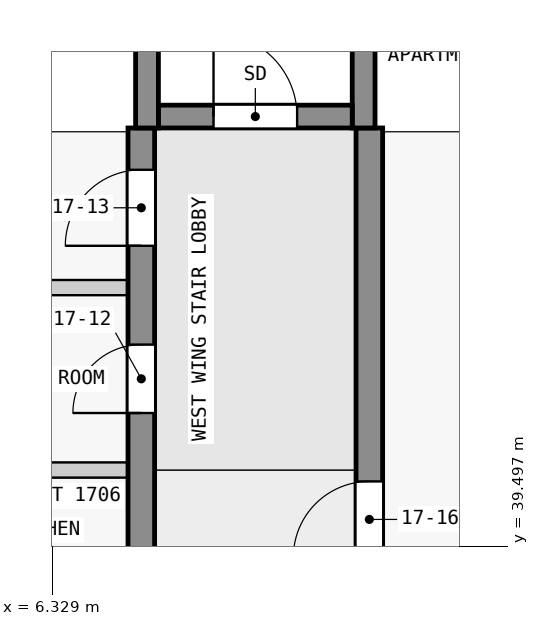
"""IFC4 building model, lengths in metres.
Left out: names, types, materials, properties, quantities, classifications, styles, units other than length and angle.
Written with IfcOpenShell. Run it as: python <this file> out.ifc"""

import sys

from ifc_helpers import new_model, si_unit, direction, frame, frame_2d, origin, place, context, subcontext, project, spatial, rectangle, extrude, element, fill, save


model = new_model("IFC4")
c1 = context("Model", 3, precision=1e-05, world=origin(), true_north=direction((0.0, 1.0)))
c2 = subcontext(c1, "Body", "Model", "MODEL_VIEW")
j1 = project(units=[si_unit("LENGTHUNIT", "METRE"), si_unit("PLANEANGLEUNIT", "RADIAN")], contexts=[c1])
p1 = place(None, origin())
s1 = spatial("IfcSite", under=j1, at=p1, CompositionType="ELEMENT")
p2 = place(p1, origin())
s2 = spatial("IfcBuilding", under=s1, at=p2, CompositionType="ELEMENT")
p3 = place(p2, frame((0.0, 0.0, 68.8)))
s3 = spatial("IfcBuildingStorey", under=s2, at=p3, CompositionType="ELEMENT", Elevation=68.8)
p4 = place(p3, frame((7.725, 45.15, 0.0), z_axis=(0.0, 0.0, 1.0), x_axis=(1.0, 0.0, 0.0)))
e1 = element("IfcWall", 1, at=p4, inside=s3, PredefinedType="SHEAR", context=c2, shape_type="SweptSolid", body=[
    extrude(rectangle(XDim=2.55, YDim=0.3, at=frame_2d((1.275, 0.0))), origin(), (0.0, 0.0, 1.0), 3.5),
])
p5 = place(p4, frame((0.725, 0.0, 0.0)))
e2 = element("IfcOpeningElement", 2, at=p5, cuts=e1, PredefinedType="OPENING", context=c2, shape_type="SweptSolid", body=[
    extrude(rectangle(XDim=1.1, YDim=2.1, at=frame_2d((0.55, 1.05))), frame((0.0, 0.16, 0.0), z_axis=(0.0, -1.0, 0.0), x_axis=(1.0, 0.0, 0.0)), (0.0, 0.0, 1.0), 0.32),
])
for number, where, z_axis, x_axis in (
    (3, (7.575, 45.0, 0.0), (0.0, 0.0, 1.0), (0.0, 1.0, 0.0)),
    (4, (10.425, 45.0, 0.0), (0.0, 0.0, 1.0), (0.0, 1.0, 0.0)),
):
    element("IfcWall", number, at=place(p3, frame(where, z_axis=z_axis, x_axis=x_axis)), inside=s3, PredefinedType="SHEAR", context=c2, shape_type="SweptSolid", body=[
        extrude(rectangle(XDim=7.2, YDim=0.3, at=frame_2d((3.6, 0.0))), origin(), (0.0, 0.0, 1.0), 3.5),
    ])
p6 = place(p3, frame((7.5, 18.0, 0.0), z_axis=(0.0, 0.0, 1.0), x_axis=(0.0, 1.0, 0.0)))
e5 = element("IfcWall", 5, at=p6, inside=s3, PredefinedType="SHEAR", context=c2, shape_type="SweptSolid", body=[
    extrude(rectangle(XDim=27.0, YDim=0.35, at=frame_2d((13.5, 0.0))), origin(), (0.0, 0.0, 1.0), 3.2),
])
p7 = place(p6, frame((1.75, 0.0, 0.0)))
e6 = element("IfcOpeningElement", 6, at=p7, cuts=e5, PredefinedType="OPENING", context=c2, shape_type="SweptSolid", body=[
    extrude(rectangle(XDim=1.0, YDim=2.1, at=frame_2d((0.5, 1.05))), frame((0.0, 0.185, 0.0), z_axis=(0.0, -1.0, 0.0), x_axis=(1.0, 0.0, 0.0)), (0.0, 0.0, 1.0), 0.37),
])
p8 = place(p6, frame((6.25, 0.0, 0.0)))
e7 = element("IfcOpeningElement", 7, at=p8, cuts=e5, PredefinedType="OPENING", context=c2, shape_type="SweptSolid", body=[
    extrude(rectangle(XDim=1.0, YDim=2.1, at=frame_2d((0.5, 1.05))), frame((0.0, 0.185, 0.0), z_axis=(0.0, -1.0, 0.0), x_axis=(1.0, 0.0, 0.0)), (0.0, 0.0, 1.0), 0.37),
])
p9 = place(p6, frame((10.75, 0.0, 0.0)))
e8 = element("IfcOpeningElement", 8, at=p9, cuts=e5, PredefinedType="OPENING", context=c2, shape_type="SweptSolid", body=[
    extrude(rectangle(XDim=1.0, YDim=2.1, at=frame_2d((0.5, 1.05))), frame((0.0, 0.185, 0.0), z_axis=(0.0, -1.0, 0.0), x_axis=(1.0, 0.0, 0.0)), (0.0, 0.0, 1.0), 0.37),
])
p10 = place(p6, frame((17.55, 0.0, 0.0)))
e9 = element("IfcOpeningElement", 9, at=p10, cuts=e5, PredefinedType="OPENING", context=c2, shape_type="SweptSolid", body=[
    extrude(rectangle(XDim=1.0, YDim=2.1, at=frame_2d((0.5, 1.05))), frame((0.0, 0.185, 0.0), z_axis=(0.0, -1.0, 0.0), x_axis=(1.0, 0.0, 0.0)), (0.0, 0.0, 1.0), 0.37),
])
p11 = place(p6, frame((23.25, 0.0, 0.0)))
e10 = element("IfcOpeningElement", 10, at=p11, cuts=e5, PredefinedType="OPENING", context=c2, shape_type="SweptSolid", body=[
    extrude(rectangle(XDim=0.9, YDim=2.1, at=frame_2d((0.45, 1.05))), frame((0.0, 0.185, 0.0), z_axis=(0.0, -1.0, 0.0), x_axis=(1.0, 0.0, 0.0)), (0.0, 0.0, 1.0), 0.37),
])
p12 = place(p6, frame((25.45, 0.0, 0.0)))
e11 = element("IfcOpeningElement", 11, at=p12, cuts=e5, PredefinedType="OPENING", context=c2, shape_type="SweptSolid", body=[
    extrude(rectangle(XDim=1.0, YDim=2.1, at=frame_2d((0.5, 1.05))), frame((0.0, 0.185, 0.0), z_axis=(0.0, -1.0, 0.0), x_axis=(1.0, 0.0, 0.0)), (0.0, 0.0, 1.0), 0.37),
])
p13 = place(p3, frame((10.5, 18.0, 0.0), z_axis=(0.0, 0.0, 1.0), x_axis=(0.0, 1.0, 0.0)))
e12 = element("IfcWall", 12, at=p13, inside=s3, PredefinedType="SHEAR", context=c2, shape_type="SweptSolid", body=[
    extrude(rectangle(XDim=27.0, YDim=0.35, at=frame_2d((13.5, 0.0))), origin(), (0.0, 0.0, 1.0), 3.2),
])
p14 = place(p13, frame((4.05, 0.0, 0.0)))
e13 = element("IfcOpeningElement", 13, at=p14, cuts=e12, PredefinedType="OPENING", context=c2, shape_type="SweptSolid", body=[
    extrude(rectangle(XDim=1.0, YDim=2.1, at=frame_2d((0.5, 1.05))), frame((0.0, 0.185, 0.0), z_axis=(0.0, -1.0, 0.0), x_axis=(1.0, 0.0, 0.0)), (0.0, 0.0, 1.0), 0.37),
])
p15 = place(p13, frame((13.05, 0.0, 0.0)))
e14 = element("IfcOpeningElement", 14, at=p15, cuts=e12, PredefinedType="OPENING", context=c2, shape_type="SweptSolid", body=[
    extrude(rectangle(XDim=1.0, YDim=2.1, at=frame_2d((0.5, 1.05))), frame((0.0, 0.185, 0.0), z_axis=(0.0, -1.0, 0.0), x_axis=(1.0, 0.0, 0.0)), (0.0, 0.0, 1.0), 0.37),
])
p16 = place(p13, frame((21.35, 0.0, 0.0)))
e15 = element("IfcOpeningElement", 15, at=p16, cuts=e12, PredefinedType="OPENING", context=c2, shape_type="SweptSolid", body=[
    extrude(rectangle(XDim=1.0, YDim=2.1, at=frame_2d((0.5, 1.05))), frame((0.0, 0.185, 0.0), z_axis=(0.0, -1.0, 0.0), x_axis=(1.0, 0.0, 0.0)), (0.0, 0.0, 1.0), 0.37),
])
p17 = place(p3, frame((7.325, 40.5, 0.0), z_axis=(0.0, 0.0, 1.0), x_axis=(-1.0, 0.0, 0.0)))
e16 = element("IfcWall", 16, at=p17, inside=s3, PredefinedType="PARTITIONING", context=c2, shape_type="SweptSolid", body=[
    extrude(rectangle(XDim=2.3, YDim=0.2, at=frame_2d((1.15, 0.0))), origin(), (0.0, 0.0, 1.0), 3.2),
])
p18 = place(p3, frame((7.325, 42.9, 0.0), z_axis=(0.0, 0.0, 1.0), x_axis=(-1.0, 0.0, 0.0)))
e17 = element("IfcWall", 17, at=p18, inside=s3, PredefinedType="PARTITIONING", context=c2, shape_type="SweptSolid", body=[
    extrude(rectangle(XDim=2.4, YDim=0.2, at=frame_2d((1.2, 0.0))), origin(), (0.0, 0.0, 1.0), 3.2),
])
p19 = place(p5, origin())
e18 = element("IfcDoor", 18, at=p19, inside=s3, OperationType="SINGLE_SWING_LEFT", PredefinedType="DOOR", context=c2, shape_type="SweptSolid", body=[
    extrude(rectangle(XDim=1.1, YDim=2.1, at=frame_2d((0.55, 1.05))), frame((0.0, 0.025, 0.0), z_axis=(0.0, -1.0, 0.0), x_axis=(1.0, 0.0, 0.0)), (0.0, 0.0, 1.0), 0.05),
])
fill(e2, e18)
p20 = place(p11, origin())
e19 = element("IfcDoor", 19, at=p20, inside=s3, OperationType="SINGLE_SWING_RIGHT", PredefinedType="DOOR", context=c2, shape_type="SweptSolid", body=[
    extrude(rectangle(XDim=0.9, YDim=2.1, at=frame_2d((0.45, 1.05))), frame((0.0, 0.025, 0.0), z_axis=(0.0, -1.0, 0.0), x_axis=(1.0, 0.0, 0.0)), (0.0, 0.0, 1.0), 0.05),
])
fill(e10, e19)
p21 = place(p12, origin())
e20 = element("IfcDoor", 20, at=p21, inside=s3, OperationType="SINGLE_SWING_RIGHT", PredefinedType="DOOR", context=c2, shape_type="SweptSolid", body=[
    extrude(rectangle(XDim=1.0, YDim=2.1, at=frame_2d((0.5, 1.05))), frame((0.0, 0.025, 0.0), z_axis=(0.0, -1.0, 0.0), x_axis=(1.0, 0.0, 0.0)), (0.0, 0.0, 1.0), 0.05),
])
fill(e11, e20)
p22 = place(p16, origin())
e21 = element("IfcDoor", 21, at=p22, inside=s3, OperationType="SINGLE_SWING_RIGHT", PredefinedType="DOOR", context=c2, shape_type="SweptSolid", body=[
    extrude(rectangle(XDim=1.0, YDim=2.1, at=frame_2d((0.5, 1.05))), frame((0.0, 0.025, 0.0), z_axis=(0.0, -1.0, 0.0), x_axis=(1.0, 0.0, 0.0)), (0.0, 0.0, 1.0), 0.05),
])
fill(e15, e21)
save(model, sys.argv[1])
